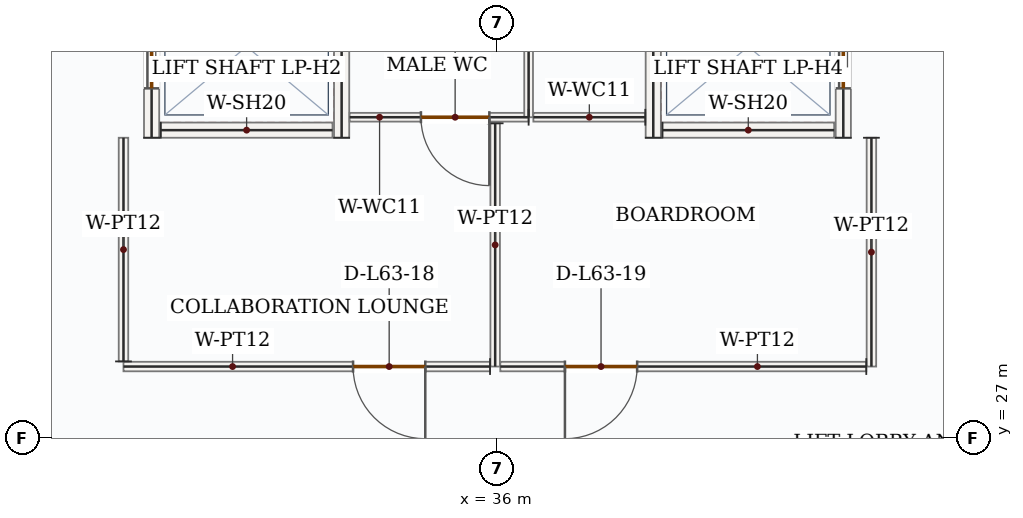
"""IFC4 building model, lengths in metres.
Left out: names, types, materials, properties, quantities, classifications, styles, units other than length and angle.
Written with IfcOpenShell. Run it as: python <this file> out.ifc"""

import sys

from ifc_helpers import new_model, si_unit, direction, frame, frame_2d, origin, place, context, subcontext, project, spatial, rectangle, extrude, source, transform, mapped, element, fill, save


model = new_model("IFC4")
c1 = context("Model", 3, precision=1e-05, world=origin(), true_north=direction((0.0, 1.0)))
c2 = subcontext(c1, "Body", "Model", "MODEL_VIEW")
j1 = project(units=[si_unit("LENGTHUNIT", "METRE"), si_unit("PLANEANGLEUNIT", "RADIAN")], contexts=[c1])
p1 = place(None, origin())
s1 = spatial("IfcSite", under=j1, at=p1, CompositionType="ELEMENT")
p2 = place(p1, origin())
s2 = spatial("IfcBuilding", under=s1, at=p2, CompositionType="ELEMENT")
p3 = place(p2, frame((0.0, 0.0, 265.35)))
s3 = spatial("IfcBuildingStorey", under=s2, at=p3, CompositionType="ELEMENT", Elevation=265.35)
p4 = place(p3, frame((31.45, 30.95, 0.0), z_axis=(0.0, 0.0, 1.0), x_axis=(0.0, 1.0, 0.0)))
e1 = element("IfcWall", 1, at=p4, inside=s3, PredefinedType="SOLIDWALL", context=c2, shape_type="SweptSolid", body=[
    extrude(rectangle(XDim=2.4, YDim=0.2, at=frame_2d((1.2, 0.0))), origin(), (0.0, 0.0, 1.0), 3.5),
])
p5 = place(p4, frame((0.65, 0.0, 0.0)))
e2 = element("IfcOpeningElement", 2, at=p5, cuts=e1, PredefinedType="OPENING", context=c2, shape_type="SweptSolid", body=[
    extrude(rectangle(XDim=1.1, YDim=2.15, at=frame_2d((0.55, 1.075))), frame((0.0, 0.11, 0.0), z_axis=(0.0, -1.0, 0.0), x_axis=(1.0, 0.0, 0.0)), (0.0, 0.0, 1.0), 0.22),
])
m1 = source(origin(), c2, "Body", "SweptSolid", [
    extrude(rectangle(XDim=2.4, YDim=0.2, at=frame_2d((1.2, 0.0))), origin(), (0.0, 0.0, 1.0), 3.5),
])
p6 = place(p3, frame((33.95, 30.95, 0.0), z_axis=(0.0, 0.0, 1.0), x_axis=(0.0, 1.0, 0.0)))
e3 = element("IfcWall", 3, at=p6, inside=s3, PredefinedType="SOLIDWALL", context=c2, shape_type="MappedRepresentation", body=[
    mapped(m1, transform((0.0, 0.0, 0.0), x_axis=(1.0, 0.0, 0.0), y_axis=(0.0, 1.0, 0.0), z_axis=(0.0, 0.0, 1.0), scale=1.0)),
])
m2 = source(origin(), c2, "Body", "SweptSolid", [
    extrude(rectangle(XDim=2.26, YDim=0.2, at=frame_2d((1.13, 0.0))), origin(), (0.0, 0.0, 1.0), 3.5),
])
p7 = place(p3, frame((31.57, 31.05, 0.0), z_axis=(0.0, 0.0, 1.0), x_axis=(1.0, 0.0, 0.0)))
e4 = element("IfcWall", 4, at=p7, inside=s3, PredefinedType="SOLIDWALL", context=c2, shape_type="MappedRepresentation", body=[
    mapped(m2, transform((0.0, 0.0, 0.0), x_axis=(1.0, 0.0, 0.0), y_axis=(0.0, 1.0, 0.0), z_axis=(0.0, 0.0, 1.0), scale=1.0)),
])
p8 = place(p3, frame((38.05, 30.95, 0.0), z_axis=(0.0, 0.0, 1.0), x_axis=(0.0, 1.0, 0.0)))
e5 = element("IfcWall", 5, at=p8, inside=s3, PredefinedType="SOLIDWALL", context=c2, shape_type="MappedRepresentation", body=[
    mapped(m1, transform((0.0, 0.0, 0.0), x_axis=(1.0, 0.0, 0.0), y_axis=(0.0, 1.0, 0.0), z_axis=(0.0, 0.0, 1.0), scale=1.0)),
])
p9 = place(p3, frame((40.55, 30.95, 0.0), z_axis=(0.0, 0.0, 1.0), x_axis=(0.0, 1.0, 0.0)))
e6 = element("IfcWall", 6, at=p9, inside=s3, PredefinedType="SOLIDWALL", context=c2, shape_type="SweptSolid", body=[
    extrude(rectangle(XDim=2.4, YDim=0.2, at=frame_2d((1.2, 0.0))), origin(), (0.0, 0.0, 1.0), 3.5),
])
p10 = place(p9, frame((0.65, 0.0, 0.0)))
e7 = element("IfcOpeningElement", 7, at=p10, cuts=e6, PredefinedType="OPENING", context=c2, shape_type="SweptSolid", body=[
    extrude(rectangle(XDim=1.1, YDim=2.15, at=frame_2d((0.55, 1.075))), frame((0.0, 0.11, 0.0), z_axis=(0.0, -1.0, 0.0), x_axis=(1.0, 0.0, 0.0)), (0.0, 0.0, 1.0), 0.22),
])
p11 = place(p3, frame((38.17, 31.05, 0.0), z_axis=(0.0, 0.0, 1.0), x_axis=(1.0, 0.0, 0.0)))
e8 = element("IfcWall", 8, at=p11, inside=s3, PredefinedType="SOLIDWALL", context=c2, shape_type="MappedRepresentation", body=[
    mapped(m2, transform((0.0, 0.0, 0.0), x_axis=(1.0, 0.0, 0.0), y_axis=(0.0, 1.0, 0.0), z_axis=(0.0, 0.0, 1.0), scale=1.0)),
])
p12 = place(p3, frame((36.41, 31.22, 0.0), z_axis=(0.0, 0.0, 1.0), x_axis=(-1.0, 0.0, 0.0)))
e9 = element("IfcWall", 9, at=p12, inside=s3, PredefinedType="PARTITIONING", context=c2, shape_type="SweptSolid", body=[
    extrude(rectangle(XDim=2.355, YDim=0.115, at=frame_2d((1.177, 0.0))), origin(), (0.0, 0.0, 1.0), 3.5),
])
p13 = place(p12, frame((0.517, 0.0, 0.0)))
e10 = element("IfcOpeningElement", 10, at=p13, cuts=e9, PredefinedType="OPENING", context=c2, shape_type="SweptSolid", body=[
    extrude(rectangle(XDim=0.9, YDim=2.1, at=frame_2d((0.45, 1.05))), frame((0.0, 0.067, 0.0), z_axis=(0.0, -1.0, 0.0), x_axis=(1.0, 0.0, 0.0)), (0.0, 0.0, 1.0), 0.135),
])
m3 = source(origin(), c2, "Body", "SweptSolid", [
    extrude(rectangle(XDim=1.96, YDim=0.115, at=frame_2d((0.98, 0.0))), origin(), (0.0, 0.0, 1.0), 3.5),
])
p14 = place(p3, frame((36.41, 33.18, 0.0), z_axis=(0.0, 0.0, 1.0), x_axis=(0.0, -1.0, 0.0)))
e11 = element("IfcWall", 11, at=p14, inside=s3, PredefinedType="PARTITIONING", context=c2, shape_type="MappedRepresentation", body=[
    mapped(m3, transform((0.0, 0.0, 0.0), x_axis=(1.0, 0.0, 0.0), y_axis=(0.0, 1.0, 0.0), z_axis=(0.0, 0.0, 1.0), scale=1.0)),
])
m4 = source(origin(), c2, "Body", "SweptSolid", [
    extrude(rectangle(XDim=1.473, YDim=0.115, at=frame_2d((0.736, 0.0))), origin(), (0.0, 0.0, 1.0), 3.5),
])
p15 = place(p3, frame((37.945, 31.22, 0.0), z_axis=(0.0, 0.0, 1.0), x_axis=(-1.0, 0.0, 0.0)))
e12 = element("IfcWall", 12, at=p15, inside=s3, PredefinedType="PARTITIONING", context=c2, shape_type="MappedRepresentation", body=[
    mapped(m4, transform((0.0, 0.0, 0.0), x_axis=(1.0, 0.0, 0.0), y_axis=(0.0, 1.0, 0.0), z_axis=(0.0, 0.0, 1.0), scale=1.0)),
])
m5 = source(origin(), c2, "Body", "SweptSolid", [
    extrude(rectangle(XDim=3.2, YDim=0.125, at=frame_2d((1.6, 0.0))), origin(), (0.0, 0.0, 1.0), 3.5),
])
p16 = place(p3, frame((35.97, 31.14, 0.0), z_axis=(0.0, 0.0, 1.0), x_axis=(0.0, -1.0, 0.0)))
e13 = element("IfcWall", 13, at=p16, inside=s3, PredefinedType="PARTITIONING", context=c2, shape_type="MappedRepresentation", body=[
    mapped(m5, transform((0.0, 0.0, 0.0), x_axis=(1.0, 0.0, 0.0), y_axis=(0.0, 1.0, 0.0), z_axis=(0.0, 0.0, 1.0), scale=1.0)),
])
p17 = place(p3, frame((35.903, 27.94, 0.0), z_axis=(0.0, 0.0, 1.0), x_axis=(-1.0, 0.0, 0.0)))
e14 = element("IfcWall", 14, at=p17, inside=s3, PredefinedType="PARTITIONING", context=c2, shape_type="SweptSolid", body=[
    extrude(rectangle(XDim=4.823, YDim=0.125, at=frame_2d((2.411, 0.0))), origin(), (0.0, 0.0, 1.0), 3.5),
])
p18 = place(p17, frame((0.852, 0.0, 0.0)))
e15 = element("IfcOpeningElement", 15, at=p18, cuts=e14, PredefinedType="OPENING", context=c2, shape_type="SweptSolid", body=[
    extrude(rectangle(XDim=0.95, YDim=2.15, at=frame_2d((0.475, 1.075))), frame((0.0, 0.073, 0.0), z_axis=(0.0, -1.0, 0.0), x_axis=(1.0, 0.0, 0.0)), (0.0, 0.0, 1.0), 0.145),
])
m6 = source(origin(), c2, "Body", "SweptSolid", [
    extrude(rectangle(XDim=2.942, YDim=0.125, at=frame_2d((1.471, 0.0))), origin(), (0.0, 0.0, 1.0), 3.5),
])
p19 = place(p3, frame((31.08, 28.008, 0.0), z_axis=(0.0, 0.0, 1.0), x_axis=(0.0, 1.0, 0.0)))
e16 = element("IfcWall", 16, at=p19, inside=s3, PredefinedType="PARTITIONING", context=c2, shape_type="MappedRepresentation", body=[
    mapped(m6, transform((0.0, 0.0, 0.0), x_axis=(1.0, 0.0, 0.0), y_axis=(0.0, 1.0, 0.0), z_axis=(0.0, 0.0, 1.0), scale=1.0)),
])
m7 = source(origin(), c2, "Body", "SweptSolid", [
    extrude(rectangle(XDim=3.01, YDim=0.125, at=frame_2d((1.505, 0.0))), origin(), (0.0, 0.0, 1.0), 3.5),
])
p20 = place(p3, frame((40.92, 30.95, 0.0), z_axis=(0.0, 0.0, 1.0), x_axis=(0.0, -1.0, 0.0)))
e17 = element("IfcWall", 17, at=p20, inside=s3, PredefinedType="PARTITIONING", context=c2, shape_type="MappedRepresentation", body=[
    mapped(m7, transform((0.0, 0.0, 0.0), x_axis=(1.0, 0.0, 0.0), y_axis=(0.0, 1.0, 0.0), z_axis=(0.0, 0.0, 1.0), scale=1.0)),
])
p21 = place(p3, frame((40.853, 27.94, 0.0), z_axis=(0.0, 0.0, 1.0), x_axis=(-1.0, 0.0, 0.0)))
e18 = element("IfcWall", 18, at=p21, inside=s3, PredefinedType="PARTITIONING", context=c2, shape_type="SweptSolid", body=[
    extrude(rectangle(XDim=4.815, YDim=0.125, at=frame_2d((2.407, 0.0))), origin(), (0.0, 0.0, 1.0), 3.5),
])
p22 = place(p21, frame((3.015, 0.0, 0.0)))
e19 = element("IfcOpeningElement", 19, at=p22, cuts=e18, PredefinedType="OPENING", context=c2, shape_type="SweptSolid", body=[
    extrude(rectangle(XDim=0.95, YDim=2.15, at=frame_2d((0.475, 1.075))), frame((0.0, 0.073, 0.0), z_axis=(0.0, -1.0, 0.0), x_axis=(1.0, 0.0, 0.0)), (0.0, 0.0, 1.0), 0.145),
])
m8 = source(origin(), c2, "Body", "SweptSolid", [
    extrude(rectangle(XDim=1.1, YDim=2.15, at=frame_2d((0.55, 1.075))), frame((0.0, 0.025, 0.0), z_axis=(0.0, -1.0, 0.0), x_axis=(1.0, 0.0, 0.0)), (0.0, 0.0, 1.0), 0.05),
])
p23 = place(p5, origin())
e20 = element("IfcDoor", 20, at=p23, inside=s3, OperationType="DOUBLE_DOOR_SLIDING", PredefinedType="DOOR", context=c2, shape_type="MappedRepresentation", body=[
    mapped(m8, transform((0.0, 0.0, 0.0), x_axis=(1.0, 0.0, 0.0), y_axis=(0.0, 1.0, 0.0), z_axis=(0.0, 0.0, 1.0), scale=1.0)),
])
fill(e2, e20)
p24 = place(p10, origin())
e21 = element("IfcDoor", 21, at=p24, inside=s3, OperationType="DOUBLE_DOOR_SLIDING", PredefinedType="DOOR", context=c2, shape_type="MappedRepresentation", body=[
    mapped(m8, transform((0.0, 0.0, 0.0), x_axis=(1.0, 0.0, 0.0), y_axis=(0.0, 1.0, 0.0), z_axis=(0.0, 0.0, 1.0), scale=1.0)),
])
fill(e7, e21)
m9 = source(origin(), c2, "Body", "SweptSolid", [
    extrude(rectangle(XDim=0.95, YDim=2.15, at=frame_2d((0.475, 1.075))), frame((0.0, 0.025, 0.0), z_axis=(0.0, -1.0, 0.0), x_axis=(1.0, 0.0, 0.0)), (0.0, 0.0, 1.0), 0.05),
])
p25 = place(p18, origin())
e22 = element("IfcDoor", 22, at=p25, inside=s3, OperationType="SINGLE_SWING_LEFT", PredefinedType="DOOR", context=c2, shape_type="MappedRepresentation", body=[
    mapped(m9, transform((0.0, 0.0, 0.0), x_axis=(1.0, 0.0, 0.0), y_axis=(0.0, 1.0, 0.0), z_axis=(0.0, 0.0, 1.0), scale=1.0)),
])
fill(e15, e22)
p26 = place(p22, origin())
e23 = element("IfcDoor", 23, at=p26, inside=s3, OperationType="SINGLE_SWING_RIGHT", PredefinedType="DOOR", context=c2, shape_type="MappedRepresentation", body=[
    mapped(m9, transform((0.0, 0.0, 0.0), x_axis=(1.0, 0.0, 0.0), y_axis=(0.0, 1.0, 0.0), z_axis=(0.0, 0.0, 1.0), scale=1.0)),
])
fill(e19, e23)
m10 = source(origin(), c2, "Body", "SweptSolid", [
    extrude(rectangle(XDim=0.9, YDim=2.1, at=frame_2d((0.45, 1.05))), frame((0.0, 0.025, 0.0), z_axis=(0.0, -1.0, 0.0), x_axis=(1.0, 0.0, 0.0)), (0.0, 0.0, 1.0), 0.05),
])
p27 = place(p13, origin())
e24 = element("IfcDoor", 24, at=p27, inside=s3, OperationType="SINGLE_SWING_LEFT", PredefinedType="DOOR", context=c2, shape_type="MappedRepresentation", body=[
    mapped(m10, transform((0.0, 0.0, 0.0), x_axis=(1.0, 0.0, 0.0), y_axis=(0.0, 1.0, 0.0), z_axis=(0.0, 0.0, 1.0), scale=1.0)),
])
fill(e10, e24)
save(model, sys.argv[1])
